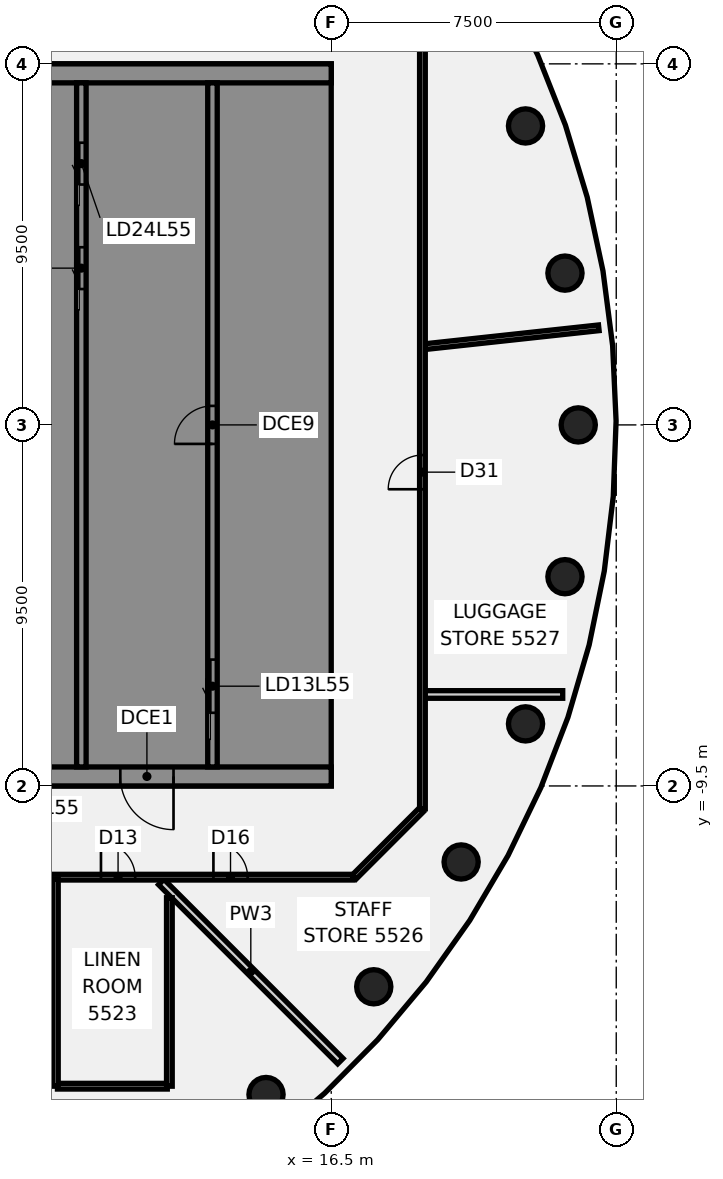
"""IFC4 building model, lengths in metres.
Left out: names, types, materials, properties, quantities, classifications, styles, units other than length and angle.
Written with IfcOpenShell. Run it as: python <this file> out.ifc"""

import sys

from ifc_helpers import new_model, si_unit, direction, frame, frame_2d, origin, origin_2d, place, context, subcontext, project, spatial, polyline, rectangle, circle, outline, extrude, element, fill, save


model = new_model("IFC4")
c1 = context("Model", 3, precision=1e-05, world=origin(), true_north=direction((0.0, 1.0)))
c2 = subcontext(c1, "Body", "Model", "MODEL_VIEW")
j1 = project(units=[si_unit("LENGTHUNIT", "METRE"), si_unit("PLANEANGLEUNIT", "RADIAN")], contexts=[c1])
p1 = place(None, origin())
s1 = spatial("IfcSite", under=j1, at=p1, CompositionType="ELEMENT")
p2 = place(p1, origin())
s2 = spatial("IfcBuilding", under=s1, at=p2, CompositionType="ELEMENT")
p3 = place(p2, frame((0.0, 0.0, 219.9)))
s3 = spatial("IfcBuildingStorey", under=s2, at=p3, CompositionType="ELEMENT", Elevation=219.9)
for number, where, z_axis, x_axis in (
    (1, (23.0, 0.0, -0.14), (0.0, 0.0, 1.0), (1.0, 0.0, 0.0)),
    (2, (22.651, 3.994, -0.14), (0.0, 0.0, 1.0), (1.0, 0.0, 0.0)),
    (3, (21.613, 7.866, -0.14), (0.0, 0.0, 1.0), (1.0, 0.0, 0.0)),
    (4, (14.784, -17.619, -0.14), (0.0, 0.0, 1.0), (1.0, 0.0, 0.0)),
    (5, (17.619, -14.784, -0.14), (0.0, 0.0, 1.0), (1.0, 0.0, 0.0)),
    (6, (19.919, -11.5, -0.14), (0.0, 0.0, 1.0), (1.0, 0.0, 0.0)),
    (7, (21.613, -7.866, -0.14), (0.0, 0.0, 1.0), (1.0, 0.0, 0.0)),
    (8, (22.651, -3.994, -0.14), (0.0, 0.0, 1.0), (1.0, 0.0, 0.0)),
):
    element("IfcColumn", number, at=place(p3, frame(where, z_axis=z_axis, x_axis=x_axis)), inside=s3, PredefinedType="COLUMN", context=c2, shape_type="SweptSolid", body=[
        extrude(circle(Radius=0.45, at=origin_2d()), origin(), (0.0, 0.0, 1.0), 3.6),
    ])
p4 = place(p3, frame((12.027, -12.027, 0.0), z_axis=(0.0, 0.0, 1.0), x_axis=(0.707106781187, -0.707106781187, 0.0)))
e9 = element("IfcWall", 9, at=p4, inside=s3, PredefinedType="PARTITIONING", context=c2, shape_type="SweptSolid", body=[
    extrude(rectangle(XDim=6.665, YDim=0.2, at=frame_2d((3.333, 0.0))), origin(), (0.0, 0.0, 1.0), 2.864),
])
p5 = place(p3, frame((-17.1, -11.9, 0.0), z_axis=(0.0, 0.0, 1.0), x_axis=(1.0, 0.0, 0.0)))
e10 = element("IfcWall", 10, at=p5, inside=s3, PredefinedType="PARTITIONING", context=c2, shape_type="SweptSolid", body=[
    extrude(rectangle(XDim=34.165, YDim=0.15, at=frame_2d((17.083, 0.0))), origin(), (0.0, 0.0, 1.0), 2.864),
])
p6 = place(p5, frame((6.1, 0.0, 0.0)))
e11 = element("IfcOpeningElement", 11, at=p6, cuts=e10, PredefinedType="OPENING", context=c2, shape_type="SweptSolid", body=[
    extrude(rectangle(XDim=0.9, YDim=2.1, at=frame_2d((0.45, 1.05))), frame((0.0, 0.085, 0.0), z_axis=(0.0, -1.0, 0.0), x_axis=(1.0, 0.0, 0.0)), (0.0, 0.0, 1.0), 0.17),
])
p7 = place(p5, frame((27.541, 0.0, 0.0)))
e12 = element("IfcOpeningElement", 12, at=p7, cuts=e10, PredefinedType="OPENING", context=c2, shape_type="SweptSolid", body=[
    extrude(rectangle(XDim=0.9, YDim=2.1, at=frame_2d((0.45, 1.05))), frame((0.0, 0.085, 0.0), z_axis=(0.0, -1.0, 0.0), x_axis=(1.0, 0.0, 0.0)), (0.0, 0.0, 1.0), 0.17),
])
p8 = place(p5, frame((19.152, 0.0, 0.0)))
e13 = element("IfcOpeningElement", 13, at=p8, cuts=e10, PredefinedType="OPENING", context=c2, shape_type="SweptSolid", body=[
    extrude(rectangle(XDim=1.8, YDim=2.1, at=frame_2d((0.9, 1.05))), frame((0.0, 0.085, 0.0), z_axis=(0.0, -1.0, 0.0), x_axis=(1.0, 0.0, 0.0)), (0.0, 0.0, 1.0), 0.17),
])
p9 = place(p5, frame((10.359, 0.0, 0.0)))
e14 = element("IfcOpeningElement", 14, at=p9, cuts=e10, PredefinedType="OPENING", context=c2, shape_type="SweptSolid", body=[
    extrude(rectangle(XDim=1.8, YDim=2.1, at=frame_2d((0.9, 1.05))), frame((0.0, 0.085, 0.0), z_axis=(0.0, -1.0, 0.0), x_axis=(1.0, 0.0, 0.0)), (0.0, 0.0, 1.0), 0.17),
])
p10 = place(p5, frame((30.5, 0.0, 0.0)))
e15 = element("IfcOpeningElement", 15, at=p10, cuts=e10, PredefinedType="OPENING", context=c2, shape_type="SweptSolid", body=[
    extrude(rectangle(XDim=0.9, YDim=2.1, at=frame_2d((0.45, 1.05))), frame((0.0, 0.085, 0.0), z_axis=(0.0, -1.0, 0.0), x_axis=(1.0, 0.0, 0.0)), (0.0, 0.0, 1.0), 0.17),
])
p11 = place(p5, frame((1.65, 0.0, 0.0)))
e16 = element("IfcOpeningElement", 16, at=p11, cuts=e10, PredefinedType="OPENING", context=c2, shape_type="SweptSolid", body=[
    extrude(rectangle(XDim=0.9, YDim=2.1, at=frame_2d((0.45, 1.05))), frame((0.0, 0.085, 0.0), z_axis=(0.0, -1.0, 0.0), x_axis=(1.0, 0.0, 0.0)), (0.0, 0.0, 1.0), 0.17),
])
p12 = place(p3, frame((9.296, -17.4, 0.0), z_axis=(0.0, 0.0, 1.0), x_axis=(1.0, 0.0, 0.0)))
e17 = element("IfcWall", 17, at=p12, inside=s3, PredefinedType="PARTITIONING", context=c2, shape_type="SweptSolid", body=[
    extrude(rectangle(XDim=2.89, YDim=0.15, at=frame_2d((1.445, 0.0))), origin(), (0.0, 0.0, 1.0), 2.864),
])
p13 = place(p3, frame((18.955, -7.093, 0.0), z_axis=(0.0, 0.0, 1.0), x_axis=(1.0, 0.0, 0.0)))
e18 = element("IfcWall", 18, at=p13, inside=s3, PredefinedType="PARTITIONING", context=c2, shape_type="SweptSolid", body=[
    extrude(rectangle(XDim=3.636, YDim=0.2, at=frame_2d((1.818, 0.0))), origin(), (0.0, 0.0, 1.0), 2.864),
])
p14 = place(p3, frame((18.965, 2.059, 0.0), z_axis=(0.0, 0.0, 1.0), x_axis=(0.994181439034, 0.107718458398, 0.0)))
e19 = element("IfcWall", 19, at=p14, inside=s3, PredefinedType="PARTITIONING", context=c2, shape_type="SweptSolid", body=[
    extrude(rectangle(XDim=4.603, YDim=0.15, at=frame_2d((2.302, 0.0))), origin(), (0.0, 0.0, 1.0), 2.864),
])
p15 = place(p3, frame((17.1, -11.9, 0.0), z_axis=(0.0, 0.0, 1.0), x_axis=(0.707106781187, 0.707106781187, 0.0)))
e20 = element("IfcWall", 20, at=p15, inside=s3, PredefinedType="PARTITIONING", context=c2, shape_type="SweptSolid", body=[
    extrude(rectangle(XDim=2.505, YDim=0.15, at=frame_2d((1.253, 0.0))), origin(), (0.0, 0.0, 1.0), 2.864),
])
p16 = place(p3, frame((9.241, -17.4, 0.0), z_axis=(0.0, 0.0, 1.0), x_axis=(0.0, 1.0, 0.0)))
e21 = element("IfcWall", 21, at=p16, inside=s3, PredefinedType="PARTITIONING", context=c2, shape_type="SweptSolid", body=[
    extrude(rectangle(XDim=5.445, YDim=0.15, at=frame_2d((2.722, 0.0))), origin(), (0.0, 0.0, 1.0), 2.864),
])
p17 = place(p3, frame((12.241, -17.4, 0.0), z_axis=(0.0, 0.0, 1.0), x_axis=(0.0, 1.0, 0.0)))
e22 = element("IfcWall", 22, at=p17, inside=s3, PredefinedType="PARTITIONING", context=c2, shape_type="SweptSolid", body=[
    extrude(rectangle(XDim=4.959, YDim=0.15, at=frame_2d((2.479, 0.0))), origin(), (0.0, 0.0, 1.0), 2.864),
])
p18 = place(p3, frame((18.9, -10.1, 0.0), z_axis=(0.0, 0.0, 1.0), x_axis=(0.0, 1.0, 0.0)))
e23 = element("IfcWall", 23, at=p18, inside=s3, PredefinedType="PARTITIONING", context=c2, shape_type="SweptSolid", body=[
    extrude(rectangle(XDim=20.2, YDim=0.15, at=frame_2d((10.1, 0.0))), origin(), (0.0, 0.0, 1.0), 2.864),
])
p19 = place(p18, frame((8.407, 0.0, 0.0)))
e24 = element("IfcOpeningElement", 24, at=p19, cuts=e23, PredefinedType="OPENING", context=c2, shape_type="SweptSolid", body=[
    extrude(rectangle(XDim=0.9, YDim=2.1, at=frame_2d((0.45, 1.05))), frame((0.0, 0.085, 0.0), z_axis=(0.0, -1.0, 0.0), x_axis=(1.0, 0.0, 0.0)), (0.0, 0.0, 1.0), 0.17),
])
p20 = place(p3, frame((16.5, -9.25, 0.0), z_axis=(0.0, 0.0, 1.0), x_axis=(-1.0, 0.0, 0.0)))
e25 = element("IfcWall", 25, at=p20, inside=s3, PredefinedType="SHEAR", context=c2, shape_type="SweptSolid", body=[
    extrude(rectangle(XDim=13.0, YDim=0.5, at=frame_2d((6.5, 0.0))), origin(), (0.0, 0.0, 1.0), 3.46),
])
p21 = place(p20, frame((4.15, 0.0, 0.0)))
e26 = element("IfcOpeningElement", 26, at=p21, cuts=e25, PredefinedType="OPENING", context=c2, shape_type="SweptSolid", body=[
    extrude(rectangle(XDim=1.4, YDim=2.1, at=frame_2d((0.7, 1.05))), frame((0.0, 0.26, 0.0), z_axis=(0.0, -1.0, 0.0), x_axis=(1.0, 0.0, 0.0)), (0.0, 0.0, 1.0), 0.52),
])
p22 = place(p20, frame((10.125, 0.0, 0.0)))
e27 = element("IfcOpeningElement", 27, at=p22, cuts=e25, PredefinedType="OPENING", context=c2, shape_type="SweptSolid", body=[
    extrude(rectangle(XDim=1.4, YDim=2.1, at=frame_2d((0.7, 1.05))), frame((0.0, 0.26, 0.0), z_axis=(0.0, -1.0, 0.0), x_axis=(1.0, 0.0, 0.0)), (0.0, 0.0, 1.0), 0.52),
])
p23 = place(p3, origin())
e28 = element("IfcWall", 28, at=p23, inside=s3, PredefinedType="SHEAR", context=c2, shape_type="SweptSolid", body=[
    extrude(outline(polyline([(13.5, -8.125), (13.5, -9.0), (16.0, -9.0), (16.5, -9.0), (16.5, 9.0), (16.0, 9.0), (13.5, 9.0), (13.5, 8.125), (16.0, 8.125), (16.0, 5.625), (13.5, 5.625), (13.5, 5.375), (16.0, 5.375), (16.0, -5.375), (13.5, -5.375), (13.5, -5.625), (16.0, -5.625), (16.0, -8.125), (13.5, -8.125)])), origin(), (0.0, 0.0, 1.0), 3.46),
])
p24 = place(p3, frame((16.5, 9.25, 0.0), z_axis=(0.0, 0.0, 1.0), x_axis=(-1.0, 0.0, 0.0)))
e29 = element("IfcWall", 29, at=p24, inside=s3, PredefinedType="SHEAR", context=c2, shape_type="SweptSolid", body=[
    extrude(rectangle(XDim=13.0, YDim=0.5, at=frame_2d((6.5, 0.0))), origin(), (0.0, 0.0, 1.0), 3.46),
])
p25 = place(p3, origin())
e30 = element("IfcWall", 30, at=p25, inside=s3, PredefinedType="SHEAR", context=c2, shape_type="SweptSolid", body=[
    extrude(outline(polyline([(9.8, -5.375), (7.5, -5.375), (7.5, -2.875), (9.8, -2.875), (9.8, -2.625), (7.5, -2.625), (7.5, -0.125), (9.8, -0.125), (9.8, 0.125), (7.5, 0.125), (7.5, 2.625), (9.8, 2.625), (9.8, 2.875), (7.5, 2.875), (7.5, 5.375), (9.8, 5.375), (9.8, 5.625), (7.5, 5.625), (7.5, 8.125), (9.8, 8.125), (9.8, 9.0), (7.5, 9.0), (7.25, 9.0), (7.25, -5.625), (7.5, -5.625), (9.8, -5.625), (9.8, -5.375)])), origin(), (0.0, 0.0, 1.0), 3.46),
])
p26 = place(p3, origin())
e31 = element("IfcWall", 31, at=p26, inside=s3, PredefinedType="SHEAR", context=c2, shape_type="SweptSolid", body=[
    extrude(outline(polyline([(7.5, -8.125), (7.5, -9.0), (9.8, -9.0), (9.8, -8.125), (9.8, -5.625), (9.55, -5.625), (9.55, -8.125), (7.5, -8.125)])), origin(), (0.0, 0.0, 1.0), 3.46),
])
p27 = place(p3, frame((13.375, -9.0, 0.0), z_axis=(0.0, 0.0, 1.0), x_axis=(0.0, 1.0, 0.0)))
e32 = element("IfcWall", 32, at=p27, inside=s3, PredefinedType="SHEAR", context=c2, shape_type="SweptSolid", body=[
    extrude(rectangle(XDim=18.0, YDim=0.25, at=frame_2d((9.0, 0.0))), origin(), (0.0, 0.0, 1.0), 3.46),
])
p28 = place(p27, frame((1.425, 0.0, 0.0)))
e33 = element("IfcOpeningElement", 33, at=p28, cuts=e32, PredefinedType="OPENING", context=c2, shape_type="SweptSolid", body=[
    extrude(rectangle(XDim=1.4, YDim=2.1, at=frame_2d((0.7, 1.05))), frame((0.0, 0.135, 0.0), z_axis=(0.0, -1.0, 0.0), x_axis=(1.0, 0.0, 0.0)), (0.0, 0.0, 1.0), 0.27),
])
p29 = place(p27, frame((8.5, 0.0, 0.0)))
e34 = element("IfcOpeningElement", 34, at=p29, cuts=e32, PredefinedType="OPENING", context=c2, shape_type="SweptSolid", body=[
    extrude(rectangle(XDim=1.0, YDim=2.1, at=frame_2d((0.5, 1.05))), frame((0.0, 0.135, 0.0), z_axis=(0.0, -1.0, 0.0), x_axis=(1.0, 0.0, 0.0)), (0.0, 0.0, 1.0), 0.27),
])
p30 = place(p3, frame((9.925, -9.0, 0.0), z_axis=(0.0, 0.0, 1.0), x_axis=(0.0, 1.0, 0.0)))
e35 = element("IfcWall", 35, at=p30, inside=s3, PredefinedType="SHEAR", context=c2, shape_type="SweptSolid", body=[
    extrude(rectangle(XDim=18.0, YDim=0.25, at=frame_2d((9.0, 0.0))), origin(), (0.0, 0.0, 1.0), 3.46),
])
p31 = place(p30, frame((12.575, 0.0, 0.0)))
e36 = element("IfcOpeningElement", 36, at=p31, cuts=e35, PredefinedType="OPENING", context=c2, shape_type="SweptSolid", body=[
    extrude(rectangle(XDim=1.1, YDim=2.1, at=frame_2d((0.55, 1.05))), frame((0.0, 0.135, 0.0), z_axis=(0.0, -1.0, 0.0), x_axis=(1.0, 0.0, 0.0)), (0.0, 0.0, 1.0), 0.27),
])
p32 = place(p30, frame((15.325, 0.0, 0.0)))
e37 = element("IfcOpeningElement", 37, at=p32, cuts=e35, PredefinedType="OPENING", context=c2, shape_type="SweptSolid", body=[
    extrude(rectangle(XDim=1.1, YDim=2.1, at=frame_2d((0.55, 1.05))), frame((0.0, 0.135, 0.0), z_axis=(0.0, -1.0, 0.0), x_axis=(1.0, 0.0, 0.0)), (0.0, 0.0, 1.0), 0.27),
])
p33 = place(p7, frame((0.9, 0.0, 0.0), z_axis=(0.0, 0.0, 1.0), x_axis=(-1.0, 0.0, 0.0)))
e38 = element("IfcDoor", 38, at=p33, inside=s3, OperationType="SINGLE_SWING_RIGHT", PredefinedType="DOOR", context=c2, shape_type="SweptSolid", body=[
    extrude(rectangle(XDim=0.9, YDim=2.1, at=frame_2d((0.45, 1.05))), frame((0.0, 0.025, 0.0), z_axis=(0.0, -1.0, 0.0), x_axis=(1.0, 0.0, 0.0)), (0.0, 0.0, 1.0), 0.05),
])
fill(e12, e38)
p34 = place(p10, frame((0.9, 0.0, 0.0), z_axis=(0.0, 0.0, 1.0), x_axis=(-1.0, 0.0, 0.0)))
e39 = element("IfcDoor", 39, at=p34, inside=s3, OperationType="SINGLE_SWING_RIGHT", PredefinedType="DOOR", context=c2, shape_type="SweptSolid", body=[
    extrude(rectangle(XDim=0.9, YDim=2.1, at=frame_2d((0.45, 1.05))), frame((0.0, 0.025, 0.0), z_axis=(0.0, -1.0, 0.0), x_axis=(1.0, 0.0, 0.0)), (0.0, 0.0, 1.0), 0.05),
])
fill(e15, e39)
p35 = place(p19, frame((0.9, 0.0, 0.0), z_axis=(0.0, 0.0, 1.0), x_axis=(-1.0, 0.0, 0.0)))
e40 = element("IfcDoor", 40, at=p35, inside=s3, OperationType="SINGLE_SWING_LEFT", PredefinedType="DOOR", context=c2, shape_type="SweptSolid", body=[
    extrude(rectangle(XDim=0.9, YDim=2.1, at=frame_2d((0.45, 1.05))), frame((0.0, 0.025, 0.0), z_axis=(0.0, -1.0, 0.0), x_axis=(1.0, 0.0, 0.0)), (0.0, 0.0, 1.0), 0.05),
])
fill(e24, e40)
p36 = place(p21, origin())
e41 = element("IfcDoor", 41, at=p36, inside=s3, OperationType="SINGLE_SWING_LEFT", PredefinedType="DOOR", context=c2, shape_type="SweptSolid", body=[
    extrude(rectangle(XDim=1.4, YDim=2.1, at=frame_2d((0.7, 1.05))), frame((0.0, 0.025, 0.0), z_axis=(0.0, -1.0, 0.0), x_axis=(1.0, 0.0, 0.0)), (0.0, 0.0, 1.0), 0.05),
])
fill(e26, e41)
p37 = place(p28, origin())
e42 = element("IfcDoor", 42, at=p37, inside=s3, OperationType="SLIDING_TO_LEFT", PredefinedType="DOOR", context=c2, shape_type="SweptSolid", body=[
    extrude(rectangle(XDim=1.4, YDim=2.1, at=frame_2d((0.7, 1.05))), frame((0.0, 0.025, 0.0), z_axis=(0.0, -1.0, 0.0), x_axis=(1.0, 0.0, 0.0)), (0.0, 0.0, 1.0), 0.05),
])
fill(e33, e42)
p38 = place(p31, origin())
e43 = element("IfcDoor", 43, at=p38, inside=s3, OperationType="SLIDING_TO_LEFT", PredefinedType="DOOR", context=c2, shape_type="SweptSolid", body=[
    extrude(rectangle(XDim=1.1, YDim=2.1, at=frame_2d((0.55, 1.05))), frame((0.0, 0.025, 0.0), z_axis=(0.0, -1.0, 0.0), x_axis=(1.0, 0.0, 0.0)), (0.0, 0.0, 1.0), 0.05),
])
fill(e36, e43)
p39 = place(p32, origin())
e44 = element("IfcDoor", 44, at=p39, inside=s3, OperationType="SLIDING_TO_LEFT", PredefinedType="DOOR", context=c2, shape_type="SweptSolid", body=[
    extrude(rectangle(XDim=1.1, YDim=2.1, at=frame_2d((0.55, 1.05))), frame((0.0, 0.025, 0.0), z_axis=(0.0, -1.0, 0.0), x_axis=(1.0, 0.0, 0.0)), (0.0, 0.0, 1.0), 0.05),
])
fill(e37, e44)
p40 = place(p29, origin())
e45 = element("IfcDoor", 45, at=p40, inside=s3, OperationType="SINGLE_SWING_LEFT", PredefinedType="DOOR", context=c2, shape_type="SweptSolid", body=[
    extrude(rectangle(XDim=1.0, YDim=2.1, at=frame_2d((0.5, 1.05))), frame((0.0, 0.025, 0.0), z_axis=(0.0, -1.0, 0.0), x_axis=(1.0, 0.0, 0.0)), (0.0, 0.0, 1.0), 0.05),
])
fill(e34, e45)
save(model, sys.argv[1])
